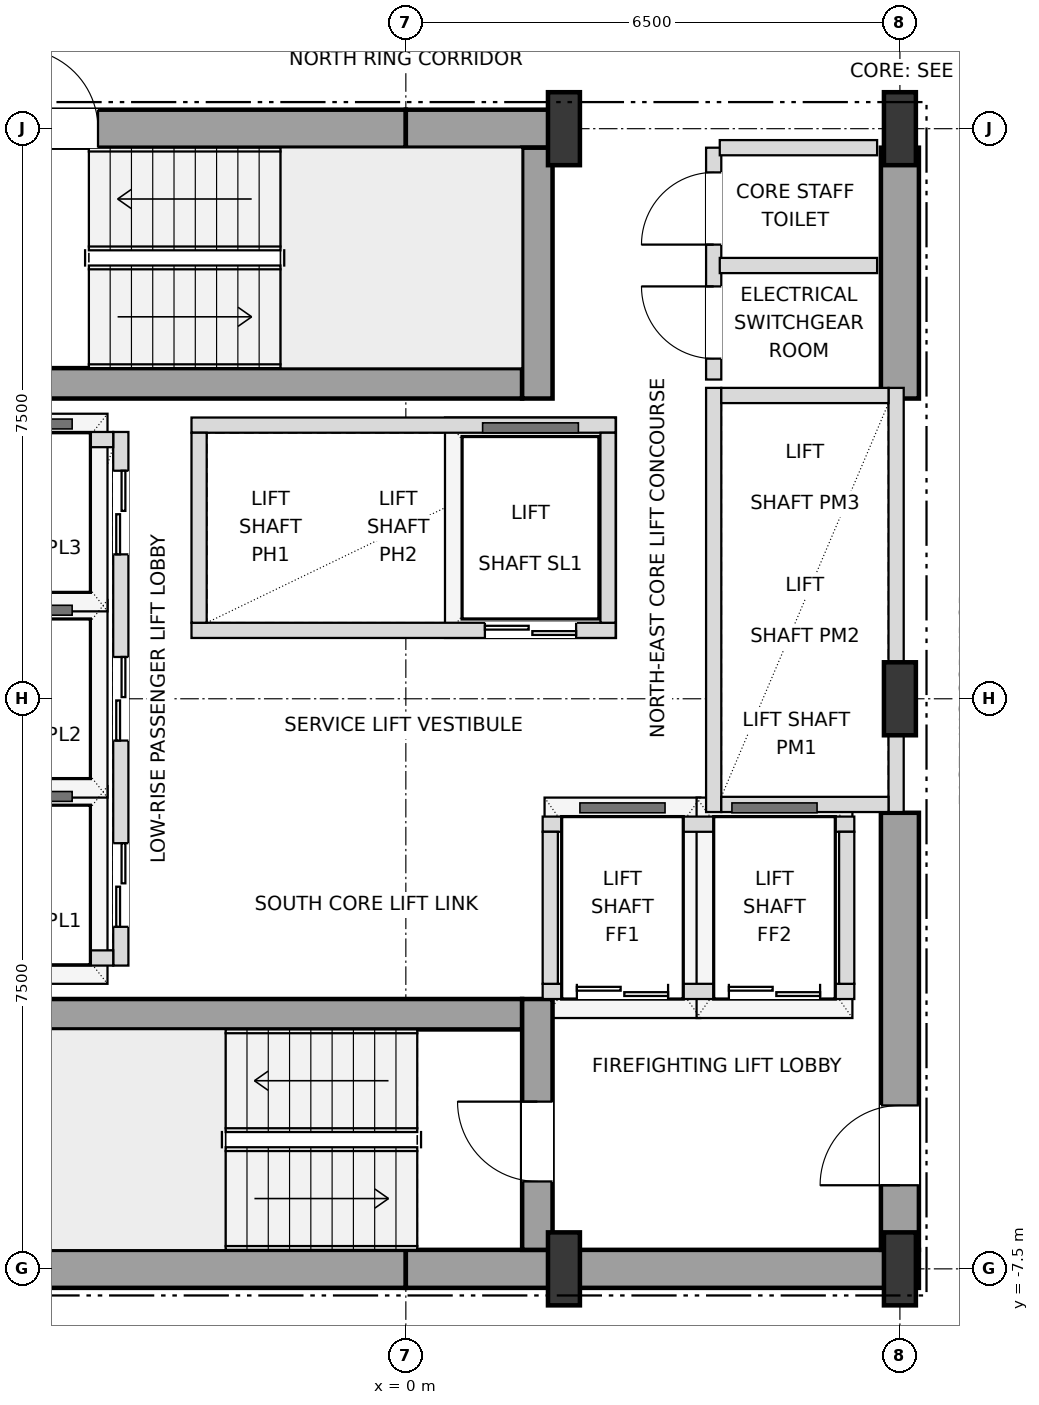
"""IFC4 building model, lengths in metres.
Left out: names, types, materials, properties, quantities, classifications, styles, units other than length and angle.
Written with IfcOpenShell. Run it as: python <this file> out.ifc"""

import sys

from ifc_helpers import new_model, si_unit, direction, frame, frame_2d, origin, origin_2d, place, context, subcontext, project, spatial, rectangle, i_section, extrude, element, fill, save


model = new_model("IFC4")
c1 = context("Model", 3, precision=1e-05, world=origin(), true_north=direction((0.0, 1.0)))
c2 = subcontext(c1, "Body", "Model", "MODEL_VIEW")
j1 = project(units=[si_unit("LENGTHUNIT", "METRE"), si_unit("PLANEANGLEUNIT", "RADIAN")], contexts=[c1])
p1 = place(None, origin())
s1 = spatial("IfcSite", under=j1, at=p1, CompositionType="ELEMENT")
p2 = place(p1, origin())
s2 = spatial("IfcBuilding", under=s1, at=p2, CompositionType="ELEMENT")
p3 = place(p2, frame((0.0, 0.0, 46.8)))
s3 = spatial("IfcBuildingStorey", under=s2, at=p3, CompositionType="ELEMENT", Elevation=46.8)
for number, where, z_axis, x_axis in (
    (1, (2.08, -7.5, 0.0), (0.0, 0.0, 1.0), (1.0, 0.0, 0.0)),
    (2, (6.5, -7.5, 0.0), (0.0, 0.0, 1.0), (1.0, 0.0, 0.0)),
    (3, (6.5, 0.0, 0.0), (0.0, 0.0, 1.0), (1.0, 0.0, 0.0)),
    (4, (2.08, 7.5, 0.0), (0.0, 0.0, 1.0), (1.0, 0.0, 0.0)),
    (5, (6.5, 7.5, 0.0), (0.0, 0.0, 1.0), (1.0, 0.0, 0.0)),
):
    element("IfcColumn", number, at=place(p3, frame(where, z_axis=z_axis, x_axis=x_axis)), inside=s3, PredefinedType="COLUMN", context=c2, shape_type="SweptSolid", body=[
        extrude(i_section(OverallWidth=0.42, OverallDepth=0.96, WebThickness=0.022, FlangeThickness=0.034, at=origin_2d()), origin(), (0.0, 0.0, 1.0), 3.6),
    ])
for number, where, z_axis, x_axis in (
    (6, (-6.75, -7.5, 0.0), (0.0, 0.0, 1.0), (1.0, 0.0, 0.0)),
    (7, (0.0, -7.5, 0.0), (0.0, 0.0, 1.0), (1.0, 0.0, 0.0)),
):
    element("IfcWall", number, at=place(p3, frame(where, z_axis=z_axis, x_axis=x_axis)), inside=s3, PredefinedType="SHEAR", context=c2, shape_type="SweptSolid", body=[
        extrude(rectangle(XDim=6.75, YDim=0.5, at=frame_2d((3.375, 0.0))), origin(), (0.0, 0.0, 1.0), 3.38),
    ])
p4 = place(p3, frame((-6.75, 7.5, 0.0), z_axis=(0.0, 0.0, 1.0), x_axis=(1.0, 0.0, 0.0)))
e8 = element("IfcWall", 8, at=p4, inside=s3, PredefinedType="SHEAR", context=c2, shape_type="SweptSolid", body=[
    extrude(rectangle(XDim=6.75, YDim=0.5, at=frame_2d((3.375, 0.0))), origin(), (0.0, 0.0, 1.0), 3.38),
])
p5 = place(p4, frame((1.65, 0.0, 0.0)))
e9 = element("IfcOpeningElement", 9, at=p5, cuts=e8, PredefinedType="OPENING", context=c2, shape_type="SweptSolid", body=[
    extrude(rectangle(XDim=1.05, YDim=2.15, at=frame_2d((0.525, 1.075))), frame((0.0, 0.26, 0.0), z_axis=(0.0, -1.0, 0.0), x_axis=(1.0, 0.0, 0.0)), (0.0, 0.0, 1.0), 0.52),
])
p6 = place(p3, frame((0.0, 7.5, 0.0), z_axis=(0.0, 0.0, 1.0), x_axis=(1.0, 0.0, 0.0)))
e10 = element("IfcWall", 10, at=p6, inside=s3, PredefinedType="SHEAR", context=c2, shape_type="SweptSolid", body=[
    extrude(rectangle(XDim=2.08, YDim=0.5, at=frame_2d((1.04, 0.0))), origin(), (0.0, 0.0, 1.0), 3.38),
])
p7 = place(p3, frame((6.5, -7.25, 0.0), z_axis=(0.0, 0.0, 1.0), x_axis=(0.0, 1.0, 0.0)))
e11 = element("IfcWall", 11, at=p7, inside=s3, PredefinedType="SHEAR", context=c2, shape_type="SweptSolid", body=[
    extrude(rectangle(XDim=5.75, YDim=0.5, at=frame_2d((2.875, 0.0))), origin(), (0.0, 0.0, 1.0), 3.38),
])
p8 = place(p7, frame((0.85, 0.0, 0.0)))
e12 = element("IfcOpeningElement", 12, at=p8, cuts=e11, PredefinedType="OPENING", context=c2, shape_type="SweptSolid", body=[
    extrude(rectangle(XDim=1.05, YDim=2.15, at=frame_2d((0.525, 1.075))), frame((0.0, 0.26, 0.0), z_axis=(0.0, -1.0, 0.0), x_axis=(1.0, 0.0, 0.0)), (0.0, 0.0, 1.0), 0.52),
])
p9 = place(p3, frame((6.5, 3.95, 0.0), z_axis=(0.0, 0.0, 1.0), x_axis=(0.0, 1.0, 0.0)))
e13 = element("IfcWall", 13, at=p9, inside=s3, PredefinedType="SHEAR", context=c2, shape_type="SweptSolid", body=[
    extrude(rectangle(XDim=3.3, YDim=0.5, at=frame_2d((1.65, 0.0))), origin(), (0.0, 0.0, 1.0), 3.38),
])
p10 = place(p3, frame((-6.25, -4.15, 0.0), z_axis=(0.0, 0.0, 1.0), x_axis=(1.0, 0.0, 0.0)))
e14 = element("IfcWall", 14, at=p10, inside=s3, PredefinedType="SHEAR", context=c2, shape_type="SweptSolid", body=[
    extrude(rectangle(XDim=7.78, YDim=0.4, at=frame_2d((3.89, 0.0))), origin(), (0.0, 0.0, 1.0), 3.38),
])
p11 = place(p3, frame((1.73, -7.25, 0.0), z_axis=(0.0, 0.0, 1.0), x_axis=(0.0, 1.0, 0.0)))
e15 = element("IfcWall", 15, at=p11, inside=s3, PredefinedType="SHEAR", context=c2, shape_type="SweptSolid", body=[
    extrude(rectangle(XDim=3.3, YDim=0.4, at=frame_2d((1.65, 0.0))), origin(), (0.0, 0.0, 1.0), 3.38),
])
p12 = place(p11, frame((0.9, 0.0, 0.0)))
e16 = element("IfcOpeningElement", 16, at=p12, cuts=e15, PredefinedType="OPENING", context=c2, shape_type="SweptSolid", body=[
    extrude(rectangle(XDim=1.05, YDim=2.15, at=frame_2d((0.525, 1.075))), frame((0.0, 0.21, 0.0), z_axis=(0.0, -1.0, 0.0), x_axis=(1.0, 0.0, 0.0)), (0.0, 0.0, 1.0), 0.42),
])
p13 = place(p3, frame((-5.55, 4.15, 0.0), z_axis=(0.0, 0.0, 1.0), x_axis=(1.0, 0.0, 0.0)))
e17 = element("IfcWall", 17, at=p13, inside=s3, PredefinedType="SHEAR", context=c2, shape_type="SweptSolid", body=[
    extrude(rectangle(XDim=7.08, YDim=0.4, at=frame_2d((3.54, 0.0))), origin(), (0.0, 0.0, 1.0), 3.38),
])
p14 = place(p3, frame((1.73, 3.95, 0.0), z_axis=(0.0, 0.0, 1.0), x_axis=(0.0, 1.0, 0.0)))
e18 = element("IfcWall", 18, at=p14, inside=s3, PredefinedType="SHEAR", context=c2, shape_type="SweptSolid", body=[
    extrude(rectangle(XDim=3.3, YDim=0.4, at=frame_2d((1.65, 0.0))), origin(), (0.0, 0.0, 1.0), 3.38),
])
p15 = place(p3, frame((-3.75, -3.51, 0.0), z_axis=(0.0, 0.0, 1.0), x_axis=(0.0, 1.0, 0.0)))
e19 = element("IfcWall", 19, at=p15, inside=s3, PredefinedType="SOLIDWALL", context=c2, shape_type="SweptSolid", body=[
    extrude(rectangle(XDim=7.02, YDim=0.2, at=frame_2d((3.51, 0.0))), origin(), (0.0, 0.0, 1.0), 3.38),
])
p16 = place(p15, frame((0.51, 0.0, 0.0)))
e20 = element("IfcOpeningElement", 20, at=p16, cuts=e19, PredefinedType="OPENING", context=c2, shape_type="SweptSolid", body=[
    extrude(rectangle(XDim=1.1, YDim=2.15, at=frame_2d((0.55, 1.075))), frame((0.0, 0.11, 0.0), z_axis=(0.0, -1.0, 0.0), x_axis=(1.0, 0.0, 0.0)), (0.0, 0.0, 1.0), 0.22),
])
p17 = place(p15, frame((2.96, 0.0, 0.0)))
e21 = element("IfcOpeningElement", 21, at=p17, cuts=e19, PredefinedType="OPENING", context=c2, shape_type="SweptSolid", body=[
    extrude(rectangle(XDim=1.1, YDim=2.15, at=frame_2d((0.55, 1.075))), frame((0.0, 0.11, 0.0), z_axis=(0.0, -1.0, 0.0), x_axis=(1.0, 0.0, 0.0)), (0.0, 0.0, 1.0), 0.22),
])
p18 = place(p15, frame((5.41, 0.0, 0.0)))
e22 = element("IfcOpeningElement", 22, at=p18, cuts=e19, PredefinedType="OPENING", context=c2, shape_type="SweptSolid", body=[
    extrude(rectangle(XDim=1.1, YDim=2.15, at=frame_2d((0.55, 1.075))), frame((0.0, 0.11, 0.0), z_axis=(0.0, -1.0, 0.0), x_axis=(1.0, 0.0, 0.0)), (0.0, 0.0, 1.0), 0.22),
])
for number, where, z_axis, x_axis in (
    (23, (-6.05, -3.41, 0.0), (0.0, 0.0, 1.0), (1.0, 0.0, 0.0)),
    (24, (-6.05, 3.41, 0.0), (0.0, 0.0, 1.0), (1.0, 0.0, 0.0)),
):
    element("IfcWall", number, at=place(p3, frame(where, z_axis=z_axis, x_axis=x_axis)), inside=s3, PredefinedType="SOLIDWALL", context=c2, shape_type="SweptSolid", body=[
        extrude(rectangle(XDim=2.2, YDim=0.2, at=frame_2d((1.1, 0.0))), origin(), (0.0, 0.0, 1.0), 3.38),
    ])
p19 = place(p3, frame((4.05, -1.49, 0.0), z_axis=(0.0, 0.0, 1.0), x_axis=(0.0, 1.0, 0.0)))
e25 = element("IfcWall", 25, at=p19, inside=s3, PredefinedType="SOLIDWALL", context=c2, shape_type="SweptSolid", body=[
    extrude(rectangle(XDim=5.58, YDim=0.2, at=frame_2d((2.79, 0.0))), origin(), (0.0, 0.0, 1.0), 3.38),
])
p20 = place(p3, frame((6.45, -1.49, 0.0), z_axis=(0.0, 0.0, 1.0), x_axis=(0.0, 1.0, 0.0)))
e26 = element("IfcWall", 26, at=p20, inside=s3, PredefinedType="SOLIDWALL", context=c2, shape_type="SweptSolid", body=[
    extrude(rectangle(XDim=5.58, YDim=0.2, at=frame_2d((2.79, 0.0))), origin(), (0.0, 0.0, 1.0), 2.816),
])
for number, where, z_axis, x_axis in (
    (27, (4.15, -1.39, 0.0), (0.0, 0.0, 1.0), (1.0, 0.0, 0.0)),
    (28, (4.15, 3.99, 0.0), (0.0, 0.0, 1.0), (1.0, 0.0, 0.0)),
):
    element("IfcWall", number, at=place(p3, frame(where, z_axis=z_axis, x_axis=x_axis)), inside=s3, PredefinedType="SOLIDWALL", context=c2, shape_type="SweptSolid", body=[
        extrude(rectangle(XDim=2.2, YDim=0.2, at=frame_2d((1.1, 0.0))), origin(), (0.0, 0.0, 1.0), 3.38),
    ])
p21 = place(p3, frame((-2.82, 0.9, 0.0), z_axis=(0.0, 0.0, 1.0), x_axis=(1.0, 0.0, 0.0)))
e29 = element("IfcWall", 29, at=p21, inside=s3, PredefinedType="SOLIDWALL", context=c2, shape_type="SweptSolid", body=[
    extrude(rectangle(XDim=5.58, YDim=0.2, at=frame_2d((2.79, 0.0))), origin(), (0.0, 0.0, 1.0), 3.38),
])
p22 = place(p21, frame((3.86, 0.0, 0.0)))
e30 = element("IfcOpeningElement", 30, at=p22, cuts=e29, PredefinedType="OPENING", context=c2, shape_type="SweptSolid", body=[
    extrude(rectangle(XDim=1.2, YDim=2.2, at=frame_2d((0.6, 1.1))), frame((0.0, 0.11, 0.0), z_axis=(0.0, -1.0, 0.0), x_axis=(1.0, 0.0, 0.0)), (0.0, 0.0, 1.0), 0.22),
])
p23 = place(p3, frame((-2.82, 3.6, 0.0), z_axis=(0.0, 0.0, 1.0), x_axis=(1.0, 0.0, 0.0)))
e31 = element("IfcWall", 31, at=p23, inside=s3, PredefinedType="SOLIDWALL", context=c2, shape_type="SweptSolid", body=[
    extrude(rectangle(XDim=5.58, YDim=0.2, at=frame_2d((2.79, 0.0))), origin(), (0.0, 0.0, 1.0), 3.38),
])
for number, where, z_axis, x_axis in (
    (32, (-2.72, 1.0, 0.0), (0.0, 0.0, 1.0), (0.0, 1.0, 0.0)),
    (33, (2.66, 1.0, 0.0), (0.0, 0.0, 1.0), (0.0, 1.0, 0.0)),
):
    element("IfcWall", number, at=place(p3, frame(where, z_axis=z_axis, x_axis=x_axis)), inside=s3, PredefinedType="SOLIDWALL", context=c2, shape_type="SweptSolid", body=[
        extrude(rectangle(XDim=2.5, YDim=0.2, at=frame_2d((1.25, 0.0))), origin(), (0.0, 0.0, 1.0), 3.38),
    ])
p24 = place(p3, frame((1.8, -3.85, 0.0), z_axis=(0.0, 0.0, 1.0), x_axis=(1.0, 0.0, 0.0)))
e34 = element("IfcWall", 34, at=p24, inside=s3, PredefinedType="SOLIDWALL", context=c2, shape_type="SweptSolid", body=[
    extrude(rectangle(XDim=4.1, YDim=0.2, at=frame_2d((2.05, 0.0))), origin(), (0.0, 0.0, 1.0), 3.38),
])
p25 = place(p24, frame((0.45, 0.0, 0.0)))
e35 = element("IfcOpeningElement", 35, at=p25, cuts=e34, PredefinedType="OPENING", context=c2, shape_type="SweptSolid", body=[
    extrude(rectangle(XDim=1.2, YDim=2.2, at=frame_2d((0.6, 1.1))), frame((0.0, 0.11, 0.0), z_axis=(0.0, -1.0, 0.0), x_axis=(1.0, 0.0, 0.0)), (0.0, 0.0, 1.0), 0.22),
])
p26 = place(p24, frame((2.45, 0.0, 0.0)))
e36 = element("IfcOpeningElement", 36, at=p26, cuts=e34, PredefinedType="OPENING", context=c2, shape_type="SweptSolid", body=[
    extrude(rectangle(XDim=1.2, YDim=2.2, at=frame_2d((0.6, 1.1))), frame((0.0, 0.11, 0.0), z_axis=(0.0, -1.0, 0.0), x_axis=(1.0, 0.0, 0.0)), (0.0, 0.0, 1.0), 0.22),
])
p27 = place(p3, frame((1.8, -1.65, 0.0), z_axis=(0.0, 0.0, 1.0), x_axis=(1.0, 0.0, 0.0)))
e37 = element("IfcWall", 37, at=p27, inside=s3, PredefinedType="SOLIDWALL", context=c2, shape_type="SweptSolid", body=[
    extrude(rectangle(XDim=4.1, YDim=0.2, at=frame_2d((2.05, 0.0))), origin(), (0.0, 0.0, 1.0), 3.38),
])
for number, where, z_axis, x_axis in (
    (38, (1.9, -3.75, 0.0), (0.0, 0.0, 1.0), (0.0, 1.0, 0.0)),
    (39, (5.8, -3.75, 0.0), (0.0, 0.0, 1.0), (0.0, 1.0, 0.0)),
):
    element("IfcWall", number, at=place(p3, frame(where, z_axis=z_axis, x_axis=x_axis)), inside=s3, PredefinedType="SOLIDWALL", context=c2, shape_type="SweptSolid", body=[
        extrude(rectangle(XDim=2.0, YDim=0.2, at=frame_2d((1.0, 0.0))), origin(), (0.0, 0.0, 1.0), 3.38),
    ])
p28 = place(p3, frame((4.05, 4.2, 0.0), z_axis=(0.0, 0.0, 1.0), x_axis=(0.0, 1.0, 0.0)))
e40 = element("IfcWall", 40, at=p28, inside=s3, PredefinedType="SOLIDWALL", context=c2, shape_type="SweptSolid", body=[
    extrude(rectangle(XDim=3.05, YDim=0.2, at=frame_2d((1.525, 0.0))), origin(), (0.0, 0.0, 1.0), 3.38),
])
p29 = place(p28, frame((0.275, 0.0, 0.0)))
e41 = element("IfcOpeningElement", 41, at=p29, cuts=e40, PredefinedType="OPENING", context=c2, shape_type="SweptSolid", body=[
    extrude(rectangle(XDim=0.95, YDim=2.15, at=frame_2d((0.475, 1.075))), frame((0.0, 0.11, 0.0), z_axis=(0.0, -1.0, 0.0), x_axis=(1.0, 0.0, 0.0)), (0.0, 0.0, 1.0), 0.22),
])
p30 = place(p28, frame((1.775, 0.0, 0.0)))
e42 = element("IfcOpeningElement", 42, at=p30, cuts=e40, PredefinedType="OPENING", context=c2, shape_type="SweptSolid", body=[
    extrude(rectangle(XDim=0.95, YDim=2.15, at=frame_2d((0.475, 1.075))), frame((0.0, 0.11, 0.0), z_axis=(0.0, -1.0, 0.0), x_axis=(1.0, 0.0, 0.0)), (0.0, 0.0, 1.0), 0.22),
])
for number, where, z_axis, x_axis in (
    (43, (4.13, 5.7, 0.0), (0.0, 0.0, 1.0), (1.0, 0.0, 0.0)),
    (44, (4.13, 7.25, 0.0), (0.0, 0.0, 1.0), (1.0, 0.0, 0.0)),
):
    element("IfcWall", number, at=place(p3, frame(where, z_axis=z_axis, x_axis=x_axis)), inside=s3, PredefinedType="SOLIDWALL", context=c2, shape_type="SweptSolid", body=[
        extrude(rectangle(XDim=2.07, YDim=0.2, at=frame_2d((1.035, 0.0))), origin(), (0.0, 0.0, 1.0), 3.38),
    ])
p31 = place(p8, origin())
e45 = element("IfcDoor", 45, at=p31, inside=s3, OperationType="SINGLE_SWING_LEFT", PredefinedType="DOOR", context=c2, shape_type="SweptSolid", body=[
    extrude(rectangle(XDim=1.05, YDim=2.15, at=frame_2d((0.525, 1.075))), frame((0.0, 0.025, 0.0), z_axis=(0.0, -1.0, 0.0), x_axis=(1.0, 0.0, 0.0)), (0.0, 0.0, 1.0), 0.05),
])
fill(e12, e45)
p32 = place(p12, origin())
e46 = element("IfcDoor", 46, at=p32, inside=s3, OperationType="SINGLE_SWING_RIGHT", PredefinedType="DOOR", context=c2, shape_type="SweptSolid", body=[
    extrude(rectangle(XDim=1.05, YDim=2.15, at=frame_2d((0.525, 1.075))), frame((0.0, 0.025, 0.0), z_axis=(0.0, -1.0, 0.0), x_axis=(1.0, 0.0, 0.0)), (0.0, 0.0, 1.0), 0.05),
])
fill(e16, e46)
p33 = place(p5, origin())
e47 = element("IfcDoor", 47, at=p33, inside=s3, OperationType="SINGLE_SWING_LEFT", PredefinedType="DOOR", context=c2, shape_type="SweptSolid", body=[
    extrude(rectangle(XDim=1.05, YDim=2.15, at=frame_2d((0.525, 1.075))), frame((0.0, 0.025, 0.0), z_axis=(0.0, -1.0, 0.0), x_axis=(1.0, 0.0, 0.0)), (0.0, 0.0, 1.0), 0.05),
])
fill(e9, e47)
p34 = place(p16, origin())
e48 = element("IfcDoor", 48, at=p34, inside=s3, OperationType="DOUBLE_DOOR_SLIDING", PredefinedType="DOOR", context=c2, shape_type="SweptSolid", body=[
    extrude(rectangle(XDim=1.1, YDim=2.15, at=frame_2d((0.55, 1.075))), frame((0.0, 0.025, 0.0), z_axis=(0.0, -1.0, 0.0), x_axis=(1.0, 0.0, 0.0)), (0.0, 0.0, 1.0), 0.05),
])
fill(e20, e48)
p35 = place(p17, origin())
e49 = element("IfcDoor", 49, at=p35, inside=s3, OperationType="DOUBLE_DOOR_SLIDING", PredefinedType="DOOR", context=c2, shape_type="SweptSolid", body=[
    extrude(rectangle(XDim=1.1, YDim=2.15, at=frame_2d((0.55, 1.075))), frame((0.0, 0.025, 0.0), z_axis=(0.0, -1.0, 0.0), x_axis=(1.0, 0.0, 0.0)), (0.0, 0.0, 1.0), 0.05),
])
fill(e21, e49)
p36 = place(p18, origin())
e50 = element("IfcDoor", 50, at=p36, inside=s3, OperationType="DOUBLE_DOOR_SLIDING", PredefinedType="DOOR", context=c2, shape_type="SweptSolid", body=[
    extrude(rectangle(XDim=1.1, YDim=2.15, at=frame_2d((0.55, 1.075))), frame((0.0, 0.025, 0.0), z_axis=(0.0, -1.0, 0.0), x_axis=(1.0, 0.0, 0.0)), (0.0, 0.0, 1.0), 0.05),
])
fill(e22, e50)
p37 = place(p22, origin())
e51 = element("IfcDoor", 51, at=p37, inside=s3, OperationType="DOUBLE_DOOR_SLIDING", PredefinedType="DOOR", context=c2, shape_type="SweptSolid", body=[
    extrude(rectangle(XDim=1.2, YDim=2.2, at=frame_2d((0.6, 1.1))), frame((0.0, 0.025, 0.0), z_axis=(0.0, -1.0, 0.0), x_axis=(1.0, 0.0, 0.0)), (0.0, 0.0, 1.0), 0.05),
])
fill(e30, e51)
p38 = place(p25, origin())
e52 = element("IfcDoor", 52, at=p38, inside=s3, OperationType="DOUBLE_DOOR_SLIDING", PredefinedType="DOOR", context=c2, shape_type="SweptSolid", body=[
    extrude(rectangle(XDim=1.2, YDim=2.2, at=frame_2d((0.6, 1.1))), frame((0.0, 0.025, 0.0), z_axis=(0.0, -1.0, 0.0), x_axis=(1.0, 0.0, 0.0)), (0.0, 0.0, 1.0), 0.05),
])
fill(e35, e52)
p39 = place(p26, origin())
e53 = element("IfcDoor", 53, at=p39, inside=s3, OperationType="DOUBLE_DOOR_SLIDING", PredefinedType="DOOR", context=c2, shape_type="SweptSolid", body=[
    extrude(rectangle(XDim=1.2, YDim=2.2, at=frame_2d((0.6, 1.1))), frame((0.0, 0.025, 0.0), z_axis=(0.0, -1.0, 0.0), x_axis=(1.0, 0.0, 0.0)), (0.0, 0.0, 1.0), 0.05),
])
fill(e36, e53)
p40 = place(p29, origin())
e54 = element("IfcDoor", 54, at=p40, inside=s3, OperationType="SINGLE_SWING_RIGHT", PredefinedType="DOOR", context=c2, shape_type="SweptSolid", body=[
    extrude(rectangle(XDim=0.95, YDim=2.15, at=frame_2d((0.475, 1.075))), frame((0.0, 0.025, 0.0), z_axis=(0.0, -1.0, 0.0), x_axis=(1.0, 0.0, 0.0)), (0.0, 0.0, 1.0), 0.05),
])
fill(e41, e54)
p41 = place(p30, origin())
e55 = element("IfcDoor", 55, at=p41, inside=s3, OperationType="SINGLE_SWING_LEFT", PredefinedType="DOOR", context=c2, shape_type="SweptSolid", body=[
    extrude(rectangle(XDim=0.95, YDim=2.15, at=frame_2d((0.475, 1.075))), frame((0.0, 0.025, 0.0), z_axis=(0.0, -1.0, 0.0), x_axis=(1.0, 0.0, 0.0)), (0.0, 0.0, 1.0), 0.05),
])
fill(e42, e55)
save(model, sys.argv[1])
